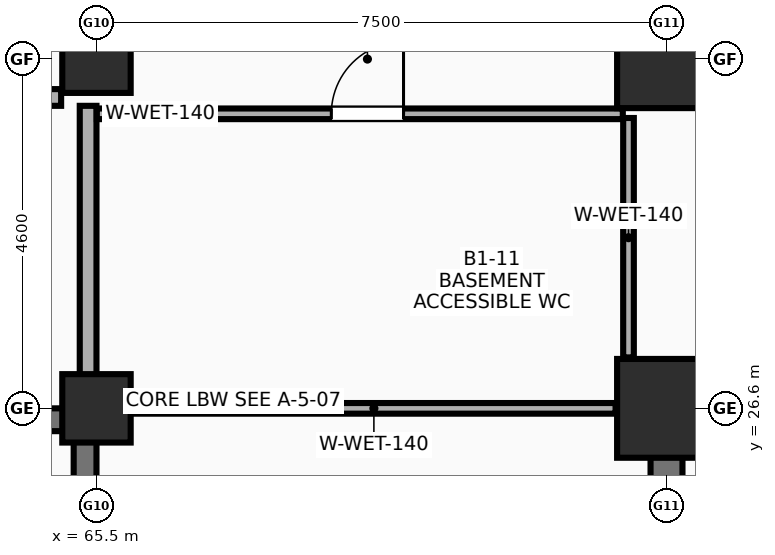
"""IFC4 building model, lengths in metres.
Left out: names, types, materials, properties, quantities, classifications, styles, units other than length and angle.
Written with IfcOpenShell. Run it as: python <this file> out.ifc"""

import sys

from ifc_helpers import new_model, si_unit, direction, frame, frame_2d, origin, origin_2d, place, context, subcontext, project, spatial, rectangle, extrude, element, fill, save


model = new_model("IFC4")
c1 = context("Model", 3, precision=1e-05, world=origin(), true_north=direction((0.0, 1.0)))
c2 = subcontext(c1, "Body", "Model", "MODEL_VIEW")
j1 = project(units=[si_unit("LENGTHUNIT", "METRE"), si_unit("PLANEANGLEUNIT", "RADIAN")], contexts=[c1])
p1 = place(None, origin())
s1 = spatial("IfcSite", under=j1, at=p1, CompositionType="ELEMENT")
p2 = place(p1, origin())
s2 = spatial("IfcBuilding", under=s1, at=p2, CompositionType="ELEMENT")
p3 = place(p2, frame((0.0, 0.0, -4.2)))
s3 = spatial("IfcBuildingStorey", under=s2, at=p3, CompositionType="ELEMENT", Elevation=-4.2)
for number, where, z_axis, x_axis in (
    (1, (65.5, 26.6, -0.42), (0.0, 0.0, 1.0), (1.0, 0.0, 0.0)),
    (2, (65.5, 31.2, -0.42), (0.0, 0.0, 1.0), (1.0, 0.0, 0.0)),
):
    element("IfcColumn", number, at=place(p3, frame(where, z_axis=z_axis, x_axis=x_axis)), inside=s3, PredefinedType="COLUMN", context=c2, shape_type="SweptSolid", body=[
        extrude(rectangle(XDim=0.9, YDim=0.9, at=origin_2d()), origin(), (0.0, 0.0, 1.0), 4.62),
    ])
for number, where, z_axis, x_axis in (
    (3, (73.0, 26.6, -0.42), (0.0, 0.0, 1.0), (1.0, 0.0, 0.0)),
    (4, (73.0, 31.2, -0.42), (0.0, 0.0, 1.0), (1.0, 0.0, 0.0)),
):
    element("IfcColumn", number, at=place(p3, frame(where, z_axis=z_axis, x_axis=x_axis)), inside=s3, PredefinedType="COLUMN", context=c2, shape_type="SweptSolid", body=[
        extrude(rectangle(XDim=1.3, YDim=1.3, at=origin_2d()), origin(), (0.0, 0.0, 1.0), 4.62),
    ])
p4 = place(p3, frame((65.35, 22.8, -0.42), z_axis=(0.0, 0.0, 1.0), x_axis=(0.0, 1.0, 0.0)))
e5 = element("IfcWall", 5, at=p4, inside=s3, PredefinedType="SHEAR", context=c2, shape_type="SweptSolid", body=[
    extrude(rectangle(XDim=3.5, YDim=0.3, at=frame_2d((1.75, 0.0))), origin(), (0.0, 0.0, 1.0), 4.62),
])
p5 = place(p3, frame((73.0, 22.64, -0.42), z_axis=(0.0, 0.0, 1.0), x_axis=(0.0, 1.0, 0.0)))
e6 = element("IfcWall", 6, at=p5, inside=s3, PredefinedType="SHEAR", context=c2, shape_type="SweptSolid", body=[
    extrude(rectangle(XDim=3.32, YDim=0.42, at=frame_2d((1.66, 0.0))), origin(), (0.0, 0.0, 1.0), 4.62),
])
p6 = place(p3, frame((58.0, 26.45, 0.0), z_axis=(0.0, 0.0, 1.0), x_axis=(1.0, 0.0, 0.0)))
e7 = element("IfcWall", 7, at=p6, inside=s3, PredefinedType="SHEAR", context=c2, shape_type="SweptSolid", body=[
    extrude(rectangle(XDim=7.5, YDim=0.3, at=frame_2d((3.75, 0.0))), origin(), (0.0, 0.0, 1.0), 4.2),
])
p7 = place(p6, frame((1.4, 0.0, 0.0)))
e8 = element("IfcOpeningElement", 8, at=p7, cuts=e7, PredefinedType="OPENING", context=c2, shape_type="SweptSolid", body=[
    extrude(rectangle(XDim=1.1, YDim=2.15, at=frame_2d((0.55, 1.075))), frame((0.0, 0.16, 0.0), z_axis=(0.0, -1.0, 0.0), x_axis=(1.0, 0.0, 0.0)), (0.0, 0.0, 1.0), 0.32),
])
p8 = place(p3, frame((58.465, 30.69, 0.0), z_axis=(0.0, 0.0, 1.0), x_axis=(1.0, 0.0, 0.0)))
e9 = element("IfcWall", 9, at=p8, inside=s3, PredefinedType="SOLIDWALL", context=c2, shape_type="SweptSolid", body=[
    extrude(rectangle(XDim=6.57, YDim=0.22, at=frame_2d((3.285, 0.0))), origin(), (0.0, 0.0, 1.0), 3.82),
])
p9 = place(p8, frame((2.435, 0.0, 0.0)))
e10 = element("IfcOpeningElement", 10, at=p9, cuts=e9, PredefinedType="OPENING", context=c2, shape_type="SweptSolid", body=[
    extrude(rectangle(XDim=1.7, YDim=2.18, at=frame_2d((0.85, 1.09))), frame((0.0, 0.12, 0.0), z_axis=(0.0, -1.0, 0.0), x_axis=(1.0, 0.0, 0.0)), (0.0, 0.0, 1.0), 0.24),
])
p10 = place(p3, frame((65.39, 26.75, 0.0), z_axis=(0.0, 0.0, 1.0), x_axis=(0.0, 1.0, 0.0)))
e11 = element("IfcWall", 11, at=p10, inside=s3, PredefinedType="SOLIDWALL", context=c2, shape_type="SweptSolid", body=[
    extrude(rectangle(XDim=3.83, YDim=0.22, at=frame_2d((1.915, 0.0))), origin(), (0.0, 0.0, 1.0), 2.96),
])
p11 = place(p3, frame((65.505, 30.475, 0.0), z_axis=(0.0, 0.0, 1.0), x_axis=(1.0, 0.0, 0.0)))
e12 = element("IfcWall", 12, at=p11, inside=s3, PredefinedType="PARTITIONING", context=c2, shape_type="SweptSolid", body=[
    extrude(rectangle(XDim=6.92, YDim=0.14, at=frame_2d((3.46, 0.0))), origin(), (0.0, 0.0, 1.0), 3.16),
])
p12 = place(p11, frame((3.085, 0.0, 0.0)))
e13 = element("IfcOpeningElement", 13, at=p12, cuts=e12, PredefinedType="OPENING", context=c2, shape_type="SweptSolid", body=[
    extrude(rectangle(XDim=0.95, YDim=2.1, at=frame_2d((0.475, 1.05))), frame((0.0, 0.08, 0.0), z_axis=(0.0, -1.0, 0.0), x_axis=(1.0, 0.0, 0.0)), (0.0, 0.0, 1.0), 0.16),
])
p13 = place(p3, frame((65.97, 26.6, 0.0), z_axis=(0.0, 0.0, 1.0), x_axis=(1.0, 0.0, 0.0)))
e14 = element("IfcWall", 14, at=p13, inside=s3, PredefinedType="PARTITIONING", context=c2, shape_type="SweptSolid", body=[
    extrude(rectangle(XDim=6.36, YDim=0.14, at=frame_2d((3.18, 0.0))), origin(), (0.0, 0.0, 1.0), 2.96),
])
p14 = place(p3, frame((72.5, 27.27, 0.0), z_axis=(0.0, 0.0, 1.0), x_axis=(0.0, 1.0, 0.0)))
e15 = element("IfcWall", 15, at=p14, inside=s3, PredefinedType="PARTITIONING", context=c2, shape_type="SweptSolid", body=[
    extrude(rectangle(XDim=3.15, YDim=0.14, at=frame_2d((1.575, 0.0))), origin(), (0.0, 0.0, 1.0), 3.82),
])
p15 = place(p12, origin())
e16 = element("IfcDoor", 16, at=p15, inside=s3, OperationType="SINGLE_SWING_RIGHT", PredefinedType="DOOR", context=c2, shape_type="SweptSolid", body=[
    extrude(rectangle(XDim=0.95, YDim=2.1, at=frame_2d((0.475, 1.05))), frame((0.0, 0.025, 0.0), z_axis=(0.0, -1.0, 0.0), x_axis=(1.0, 0.0, 0.0)), (0.0, 0.0, 1.0), 0.05),
])
fill(e13, e16)
save(model, sys.argv[1])
